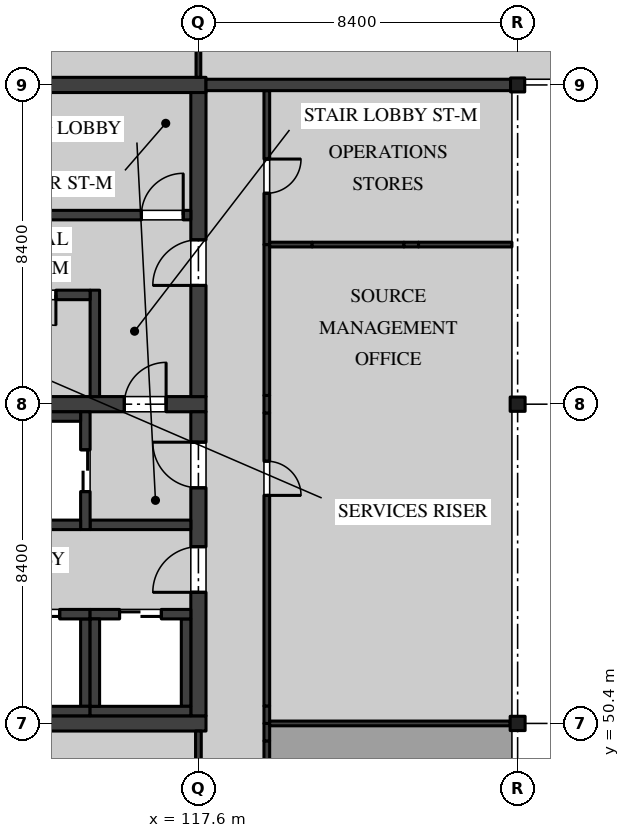
"""IFC4 building model, lengths in metres.
Left out: names, types, materials, properties, quantities, classifications, styles, units other than length and angle.
Written with IfcOpenShell. Run it as: python <this file> out.ifc"""

import sys

from ifc_helpers import new_model, si_unit, direction, frame, frame_2d, origin, origin_2d, place, context, subcontext, project, spatial, rectangle, i_section, extrude, element, fill, save


model = new_model("IFC4")
c1 = context("Model", 3, precision=1e-05, world=origin(), true_north=direction((0.0, 1.0)))
c2 = subcontext(c1, "Body", "Model", "MODEL_VIEW")
j1 = project(units=[si_unit("LENGTHUNIT", "METRE"), si_unit("PLANEANGLEUNIT", "RADIAN")], contexts=[c1])
p1 = place(None, origin())
s1 = spatial("IfcSite", under=j1, at=p1, CompositionType="ELEMENT")
p2 = place(p1, origin())
s2 = spatial("IfcBuilding", under=s1, at=p2, CompositionType="ELEMENT")
p3 = place(p2, frame((0.0, 0.0, 18.9)))
s3 = spatial("IfcBuildingStorey", under=s2, at=p3, CompositionType="ELEMENT", Elevation=18.9)
for number, where, z_axis, x_axis in (
    (1, (126.0, 50.4, 0.0), (0.0, 0.0, 1.0), (1.0, 0.0, 0.0)),
    (2, (126.0, 58.8, 0.0), (0.0, 0.0, 1.0), (1.0, 0.0, 0.0)),
):
    element("IfcColumn", number, at=place(p3, frame(where, z_axis=z_axis, x_axis=x_axis)), inside=s3, PredefinedType="COLUMN", context=c2, shape_type="SweptSolid", body=[
        extrude(i_section(OverallWidth=0.394, OverallDepth=0.376, WebThickness=0.017, FlangeThickness=0.028, FilletRadius=0.015, at=origin_2d()), origin(), (0.0, 0.0, 1.0), 4.37),
    ])
p4 = place(p3, frame((126.0, 67.2, 0.0), z_axis=(0.0, 0.0, 1.0), x_axis=(1.0, 0.0, 0.0)))
e3 = element("IfcColumn", 3, at=p4, inside=s3, PredefinedType="COLUMN", context=c2, shape_type="SweptSolid", body=[
    extrude(i_section(OverallWidth=0.373, OverallDepth=0.368, WebThickness=0.015, FlangeThickness=0.024, FilletRadius=0.015, at=origin_2d()), origin(), (0.0, 0.0, 1.0), 4.37),
])
p5 = place(p3, frame((109.0, 50.4, 0.0), z_axis=(0.0, 0.0, 1.0), x_axis=(1.0, 0.0, 0.0)))
e4 = element("IfcWall", 4, at=p5, inside=s3, PredefinedType="SHEAR", context=c2, shape_type="SweptSolid", body=[
    extrude(rectangle(XDim=8.8, YDim=0.4, at=frame_2d((4.4, 0.0))), origin(), (0.0, 0.0, 1.0), 4.37),
])
p6 = place(p3, frame((109.0, 58.8, 0.0), z_axis=(0.0, 0.0, 1.0), x_axis=(1.0, 0.0, 0.0)))
e5 = element("IfcWall", 5, at=p6, inside=s3, PredefinedType="SHEAR", context=c2, shape_type="SweptSolid", body=[
    extrude(rectangle(XDim=8.8, YDim=0.4, at=frame_2d((4.4, 0.0))), origin(), (0.0, 0.0, 1.0), 4.37),
])
p7 = place(p6, frame((6.65, 0.0, 0.0)))
e6 = element("IfcOpeningElement", 6, at=p7, cuts=e5, PredefinedType="OPENING", context=c2, shape_type="SweptSolid", body=[
    extrude(rectangle(XDim=1.1, YDim=2.1, at=frame_2d((0.55, 1.05))), frame((0.0, 0.21, 0.0), z_axis=(0.0, -1.0, 0.0), x_axis=(1.0, 0.0, 0.0)), (0.0, 0.0, 1.0), 0.42),
])
p8 = place(p3, frame((117.6, 50.6, 0.0), z_axis=(0.0, 0.0, 1.0), x_axis=(0.0, 1.0, 0.0)))
e7 = element("IfcWall", 7, at=p8, inside=s3, PredefinedType="SHEAR", context=c2, shape_type="SweptSolid", body=[
    extrude(rectangle(XDim=8.0, YDim=0.4, at=frame_2d((4.0, 0.0))), origin(), (0.0, 0.0, 1.0), 4.37),
])
p9 = place(p8, frame((3.25, 0.0, 0.0)))
e8 = element("IfcOpeningElement", 8, at=p9, cuts=e7, PredefinedType="OPENING", context=c2, shape_type="SweptSolid", body=[
    extrude(rectangle(XDim=1.2, YDim=2.1, at=frame_2d((0.6, 1.05))), frame((0.0, 0.21, 0.0), z_axis=(0.0, -1.0, 0.0), x_axis=(1.0, 0.0, 0.0)), (0.0, 0.0, 1.0), 0.42),
])
p10 = place(p8, frame((6.0, 0.0, 0.0)))
e9 = element("IfcOpeningElement", 9, at=p10, cuts=e7, PredefinedType="OPENING", context=c2, shape_type="SweptSolid", body=[
    extrude(rectangle(XDim=1.2, YDim=2.1, at=frame_2d((0.6, 1.05))), frame((0.0, 0.21, 0.0), z_axis=(0.0, -1.0, 0.0), x_axis=(1.0, 0.0, 0.0)), (0.0, 0.0, 1.0), 0.42),
])
p11 = place(p3, frame((114.75, 55.625, 0.0), z_axis=(0.0, 0.0, 1.0), x_axis=(1.0, 0.0, 0.0)))
e10 = element("IfcWall", 10, at=p11, inside=s3, PredefinedType="SOLIDWALL", context=c2, shape_type="SweptSolid", body=[
    extrude(rectangle(XDim=2.65, YDim=0.25, at=frame_2d((1.325, 0.0))), origin(), (0.0, 0.0, 1.0), 4.37),
])
p12 = place(p3, frame((109.0, 67.2, 0.0), z_axis=(0.0, 0.0, 1.0), x_axis=(1.0, 0.0, 0.0)))
e11 = element("IfcWall", 11, at=p12, inside=s3, PredefinedType="SHEAR", context=c2, shape_type="SweptSolid", body=[
    extrude(rectangle(XDim=8.8, YDim=0.4, at=frame_2d((4.4, 0.0))), origin(), (0.0, 0.0, 1.0), 4.37),
])
p13 = place(p3, frame((117.6, 59.0, 0.0), z_axis=(0.0, 0.0, 1.0), x_axis=(0.0, 1.0, 0.0)))
e12 = element("IfcWall", 12, at=p13, inside=s3, PredefinedType="SHEAR", context=c2, shape_type="SweptSolid", body=[
    extrude(rectangle(XDim=8.0, YDim=0.4, at=frame_2d((4.0, 0.0))), origin(), (0.0, 0.0, 1.0), 4.37),
])
p14 = place(p13, frame((2.925, 0.0, 0.0)))
e13 = element("IfcOpeningElement", 13, at=p14, cuts=e12, PredefinedType="OPENING", context=c2, shape_type="SweptSolid", body=[
    extrude(rectangle(XDim=1.2, YDim=2.1, at=frame_2d((0.6, 1.05))), frame((0.0, 0.21, 0.0), z_axis=(0.0, -1.0, 0.0), x_axis=(1.0, 0.0, 0.0)), (0.0, 0.0, 1.0), 0.42),
])
p15 = place(p3, frame((117.4, 63.775, 0.0), z_axis=(0.0, 0.0, 1.0), x_axis=(-1.0, 0.0, 0.0)))
e14 = element("IfcWall", 14, at=p15, inside=s3, PredefinedType="SOLIDWALL", context=c2, shape_type="SweptSolid", body=[
    extrude(rectangle(XDim=8.0, YDim=0.25, at=frame_2d((4.0, 0.0))), origin(), (0.0, 0.0, 1.0), 4.37),
])
p16 = place(p15, frame((0.2, 0.0, 0.0)))
e15 = element("IfcOpeningElement", 15, at=p16, cuts=e14, PredefinedType="OPENING", context=c2, shape_type="SweptSolid", body=[
    extrude(rectangle(XDim=1.1, YDim=2.1, at=frame_2d((0.55, 1.05))), frame((0.0, 0.135, 0.0), z_axis=(0.0, -1.0, 0.0), x_axis=(1.0, 0.0, 0.0)), (0.0, 0.0, 1.0), 0.27),
])
p17 = place(p3, frame((114.875, 61.8, 0.0), z_axis=(0.0, 0.0, 1.0), x_axis=(0.0, -1.0, 0.0)))
e16 = element("IfcWall", 16, at=p17, inside=s3, PredefinedType="SOLIDWALL", context=c2, shape_type="SweptSolid", body=[
    extrude(rectangle(XDim=2.8, YDim=0.25, at=frame_2d((1.4, 0.0))), origin(), (0.0, 0.0, 1.0), 4.37),
])
p18 = place(p3, frame((114.75, 61.675, 0.0), z_axis=(0.0, 0.0, 1.0), x_axis=(-1.0, 0.0, 0.0)))
e17 = element("IfcWall", 17, at=p18, inside=s3, PredefinedType="SOLIDWALL", context=c2, shape_type="SweptSolid", body=[
    extrude(rectangle(XDim=5.35, YDim=0.25, at=frame_2d((2.675, 0.0))), origin(), (0.0, 0.0, 1.0), 4.37),
])
p19 = place(p18, frame((3.65, 0.0, 0.0)))
e18 = element("IfcOpeningElement", 18, at=p19, cuts=e17, PredefinedType="OPENING", context=c2, shape_type="SweptSolid", body=[
    extrude(rectangle(XDim=0.9, YDim=2.1, at=frame_2d((0.45, 1.05))), frame((0.0, 0.135, 0.0), z_axis=(0.0, -1.0, 0.0), x_axis=(1.0, 0.0, 0.0)), (0.0, 0.0, 1.0), 0.27),
])
p20 = place(p18, frame((0.9, 0.0, 0.0)))
e19 = element("IfcOpeningElement", 19, at=p20, cuts=e17, PredefinedType="OPENING", context=c2, shape_type="SweptSolid", body=[
    extrude(rectangle(XDim=0.8, YDim=2.1, at=frame_2d((0.4, 1.05))), frame((0.0, 0.135, 0.0), z_axis=(0.0, -1.0, 0.0), x_axis=(1.0, 0.0, 0.0)), (0.0, 0.0, 1.0), 0.27),
])
p21 = place(p3, frame((114.625, 55.5, 0.0), z_axis=(0.0, 0.0, 1.0), x_axis=(0.0, 1.0, 0.0)))
e20 = element("IfcWall", 20, at=p21, inside=s3, PredefinedType="SOLIDWALL", context=c2, shape_type="SweptSolid", body=[
    extrude(rectangle(XDim=3.1, YDim=0.25, at=frame_2d((1.55, 0.0))), origin(), (0.0, 0.0, 1.0), 4.37),
])
p22 = place(p21, frame((1.0, 0.0, 0.0)))
e21 = element("IfcOpeningElement", 21, at=p22, cuts=e20, PredefinedType="OPENING", context=c2, shape_type="SweptSolid", body=[
    extrude(rectangle(XDim=1.1, YDim=2.1, at=frame_2d((0.55, 1.05))), frame((0.0, 0.135, 0.0), z_axis=(0.0, -1.0, 0.0), x_axis=(1.0, 0.0, 0.0)), (0.0, 0.0, 1.0), 0.27),
])
for number, where, z_axis, x_axis in (
    (22, (111.9, 58.475, 0.0), (0.0, 0.0, 1.0), (1.0, 0.0, 0.0)),
    (23, (111.9, 55.625, 0.0), (0.0, 0.0, 1.0), (1.0, 0.0, 0.0)),
):
    element("IfcWall", number, at=place(p3, frame(where, z_axis=z_axis, x_axis=x_axis)), inside=s3, PredefinedType="SOLIDWALL", context=c2, shape_type="SweptSolid", body=[
        extrude(rectangle(XDim=2.6, YDim=0.25, at=frame_2d((1.3, 0.0))), origin(), (0.0, 0.0, 1.0), 4.37),
    ])
p23 = place(p3, frame((114.625, 50.85, 0.0), z_axis=(0.0, 0.0, 1.0), x_axis=(0.0, 1.0, 0.0)))
e24 = element("IfcWall", 24, at=p23, inside=s3, PredefinedType="SOLIDWALL", context=c2, shape_type="SweptSolid", body=[
    extrude(rectangle(XDim=2.3, YDim=0.25, at=frame_2d((1.15, 0.0))), origin(), (0.0, 0.0, 1.0), 4.37),
])
p24 = place(p3, frame((112.05, 53.275, 0.0), z_axis=(0.0, 0.0, 1.0), x_axis=(1.0, 0.0, 0.0)))
e25 = element("IfcWall", 25, at=p24, inside=s3, PredefinedType="SOLIDWALL", context=c2, shape_type="SweptSolid", body=[
    extrude(rectangle(XDim=2.7, YDim=0.25, at=frame_2d((1.35, 0.0))), origin(), (0.0, 0.0, 1.0), 4.37),
])
p25 = place(p24, frame((0.8, 0.0, 0.0)))
e26 = element("IfcOpeningElement", 26, at=p25, cuts=e25, PredefinedType="OPENING", context=c2, shape_type="SweptSolid", body=[
    extrude(rectangle(XDim=1.1, YDim=2.1, at=frame_2d((0.55, 1.05))), frame((0.0, 0.135, 0.0), z_axis=(0.0, -1.0, 0.0), x_axis=(1.0, 0.0, 0.0)), (0.0, 0.0, 1.0), 0.27),
])
p26 = place(p3, frame((112.05, 50.725, 0.0), z_axis=(0.0, 0.0, 1.0), x_axis=(1.0, 0.0, 0.0)))
e27 = element("IfcWall", 27, at=p26, inside=s3, PredefinedType="SOLIDWALL", context=c2, shape_type="SweptSolid", body=[
    extrude(rectangle(XDim=2.7, YDim=0.25, at=frame_2d((1.35, 0.0))), origin(), (0.0, 0.0, 1.0), 4.37),
])
p27 = place(p3, frame((117.275, 50.85, 0.0), z_axis=(0.0, 0.0, 1.0), x_axis=(0.0, 1.0, 0.0)))
e28 = element("IfcWall", 28, at=p27, inside=s3, PredefinedType="SOLIDWALL", context=c2, shape_type="SweptSolid", body=[
    extrude(rectangle(XDim=2.3, YDim=0.25, at=frame_2d((1.15, 0.0))), origin(), (0.0, 0.0, 1.0), 4.37),
])
p28 = place(p3, frame((114.75, 53.275, 0.0), z_axis=(0.0, 0.0, 1.0), x_axis=(1.0, 0.0, 0.0)))
e29 = element("IfcWall", 29, at=p28, inside=s3, PredefinedType="SOLIDWALL", context=c2, shape_type="SweptSolid", body=[
    extrude(rectangle(XDim=2.65, YDim=0.25, at=frame_2d((1.325, 0.0))), origin(), (0.0, 0.0, 1.0), 4.37),
])
p29 = place(p28, frame((0.775, 0.0, 0.0)))
e30 = element("IfcOpeningElement", 30, at=p29, cuts=e29, PredefinedType="OPENING", context=c2, shape_type="SweptSolid", body=[
    extrude(rectangle(XDim=1.1, YDim=2.1, at=frame_2d((0.55, 1.05))), frame((0.0, 0.135, 0.0), z_axis=(0.0, -1.0, 0.0), x_axis=(1.0, 0.0, 0.0)), (0.0, 0.0, 1.0), 0.27),
])
p30 = place(p3, frame((114.75, 50.725, 0.0), z_axis=(0.0, 0.0, 1.0), x_axis=(1.0, 0.0, 0.0)))
e31 = element("IfcWall", 31, at=p30, inside=s3, PredefinedType="SOLIDWALL", context=c2, shape_type="SweptSolid", body=[
    extrude(rectangle(XDim=2.65, YDim=0.25, at=frame_2d((1.325, 0.0))), origin(), (0.0, 0.0, 1.0), 4.37),
])
p31 = place(p3, frame((114.875, 50.85, 0.0), z_axis=(0.0, 0.0, 1.0), x_axis=(0.0, 1.0, 0.0)))
e32 = element("IfcWall", 32, at=p31, inside=s3, PredefinedType="SOLIDWALL", context=c2, shape_type="SweptSolid", body=[
    extrude(rectangle(XDim=2.3, YDim=0.25, at=frame_2d((1.15, 0.0))), origin(), (0.0, 0.0, 1.0), 4.37),
])
p32 = place(p3, frame((119.4, 42.23, 0.0), z_axis=(0.0, 0.0, 1.0), x_axis=(0.0, 1.0, 0.0)))
e33 = element("IfcWall", 33, at=p32, inside=s3, PredefinedType="PARTITIONING", context=c2, shape_type="SweptSolid", body=[
    extrude(rectangle(XDim=7.71, YDim=0.15, at=frame_2d((3.855, 0.0))), origin(), (0.0, 0.0, 1.0), 4.37),
])
p33 = place(p3, frame((119.4, 49.94, 0.0), z_axis=(0.0, 0.0, 1.0), x_axis=(0.0, 1.0, 0.0)))
e34 = element("IfcWall", 34, at=p33, inside=s3, PredefinedType="PARTITIONING", context=c2, shape_type="SweptSolid", body=[
    extrude(rectangle(XDim=0.46, YDim=0.15, at=frame_2d((0.23, 0.0))), origin(), (0.0, 0.0, 1.0), 3.746),
])
p34 = place(p3, frame((119.4, 50.4, 0.0), z_axis=(0.0, 0.0, 1.0), x_axis=(0.0, 1.0, 0.0)))
e35 = element("IfcWall", 35, at=p34, inside=s3, PredefinedType="PARTITIONING", context=c2, shape_type="SweptSolid", body=[
    extrude(rectangle(XDim=0.46, YDim=0.15, at=frame_2d((0.23, 0.0))), origin(), (0.0, 0.0, 1.0), 3.746),
])
p35 = place(p3, frame((119.4, 50.86, 0.0), z_axis=(0.0, 0.0, 1.0), x_axis=(0.0, 1.0, 0.0)))
e36 = element("IfcWall", 36, at=p35, inside=s3, PredefinedType="PARTITIONING", context=c2, shape_type="SweptSolid", body=[
    extrude(rectangle(XDim=7.71, YDim=0.15, at=frame_2d((3.855, 0.0))), origin(), (0.0, 0.0, 1.0), 4.37),
])
p36 = place(p35, frame((5.54, 0.0, 0.0)))
e37 = element("IfcOpeningElement", 37, at=p36, cuts=e36, PredefinedType="OPENING", context=c2, shape_type="SweptSolid", body=[
    extrude(rectangle(XDim=0.9, YDim=2.1, at=frame_2d((0.45, 1.05))), frame((0.0, 0.085, 0.0), z_axis=(0.0, -1.0, 0.0), x_axis=(1.0, 0.0, 0.0)), (0.0, 0.0, 1.0), 0.17),
])
p37 = place(p3, frame((119.4, 58.57, 0.0), z_axis=(0.0, 0.0, 1.0), x_axis=(0.0, 1.0, 0.0)))
e38 = element("IfcWall", 38, at=p37, inside=s3, PredefinedType="PARTITIONING", context=c2, shape_type="SweptSolid", body=[
    extrude(rectangle(XDim=0.46, YDim=0.15, at=frame_2d((0.23, 0.0))), origin(), (0.0, 0.0, 1.0), 3.746),
])
p38 = place(p3, frame((119.4, 59.03, 0.0), z_axis=(0.0, 0.0, 1.0), x_axis=(0.0, 1.0, 0.0)))
e39 = element("IfcWall", 39, at=p38, inside=s3, PredefinedType="PARTITIONING", context=c2, shape_type="SweptSolid", body=[
    extrude(rectangle(XDim=3.97, YDim=0.15, at=frame_2d((1.985, 0.0))), origin(), (0.0, 0.0, 1.0), 4.37),
])
p39 = place(p3, frame((119.4, 63.0, 0.0), z_axis=(0.0, 0.0, 1.0), x_axis=(0.0, 1.0, 0.0)))
e40 = element("IfcWall", 40, at=p39, inside=s3, PredefinedType="PARTITIONING", context=c2, shape_type="SweptSolid", body=[
    extrude(rectangle(XDim=4.05, YDim=0.15, at=frame_2d((2.025, 0.0))), origin(), (0.0, 0.0, 1.0), 4.37),
])
p40 = place(p39, frame((1.35, 0.0, 0.0)))
e41 = element("IfcOpeningElement", 41, at=p40, cuts=e40, PredefinedType="OPENING", context=c2, shape_type="SweptSolid", body=[
    extrude(rectangle(XDim=0.9, YDim=2.1, at=frame_2d((0.45, 1.05))), frame((0.0, 0.085, 0.0), z_axis=(0.0, -1.0, 0.0), x_axis=(1.0, 0.0, 0.0)), (0.0, 0.0, 1.0), 0.17),
])
p41 = place(p3, frame((117.6, 42.2, 0.0), z_axis=(0.0, 0.0, 1.0), x_axis=(0.0, 1.0, 0.0)))
e42 = element("IfcWall", 42, at=p41, inside=s3, PredefinedType="PARTITIONING", context=c2, shape_type="SweptSolid", body=[
    extrude(rectangle(XDim=8.0, YDim=0.15, at=frame_2d((4.0, 0.0))), origin(), (0.0, 0.0, 1.0), 3.746),
])
p42 = place(p41, frame((3.55, 0.0, 0.0)))
e43 = element("IfcOpeningElement", 43, at=p42, cuts=e42, PredefinedType="OPENING", context=c2, shape_type="SweptSolid", body=[
    extrude(rectangle(XDim=0.9, YDim=2.1, at=frame_2d((0.45, 1.05))), frame((0.0, 0.085, 0.0), z_axis=(0.0, -1.0, 0.0), x_axis=(1.0, 0.0, 0.0)), (0.0, 0.0, 1.0), 0.17),
])
p43 = place(p3, frame((119.475, 50.4, 0.0), z_axis=(0.0, 0.0, 1.0), x_axis=(1.0, 0.0, 0.0)))
e44 = element("IfcWall", 44, at=p43, inside=s3, PredefinedType="PARTITIONING", context=c2, shape_type="SweptSolid", body=[
    extrude(rectangle(XDim=6.328, YDim=0.125, at=frame_2d((3.164, 0.0))), origin(), (0.0, 0.0, 1.0), 3.746),
])
p44 = place(p3, frame((119.475, 63.0, 0.0), z_axis=(0.0, 0.0, 1.0), x_axis=(1.0, 0.0, 0.0)))
e45 = element("IfcWall", 45, at=p44, inside=s3, PredefinedType="PARTITIONING", context=c2, shape_type="SweptSolid", body=[
    extrude(rectangle(XDim=1.118, YDim=0.125, at=frame_2d((0.559, 0.0))), origin(), (0.0, 0.0, 1.0), 3.895),
])
p45 = place(p3, frame((120.593, 63.0, 0.0), z_axis=(0.0, 0.0, 1.0), x_axis=(1.0, 0.0, 0.0)))
e46 = element("IfcWall", 46, at=p45, inside=s3, PredefinedType="PARTITIONING", context=c2, shape_type="SweptSolid", body=[
    extrude(rectangle(XDim=2.415, YDim=0.125, at=frame_2d((1.208, 0.0))), origin(), (0.0, 0.0, 1.0), 4.37),
])
p46 = place(p3, frame((123.008, 63.0, 0.0), z_axis=(0.0, 0.0, 1.0), x_axis=(1.0, 0.0, 0.0)))
e47 = element("IfcWall", 47, at=p46, inside=s3, PredefinedType="PARTITIONING", context=c2, shape_type="SweptSolid", body=[
    extrude(rectangle(XDim=0.384, YDim=0.125, at=frame_2d((0.192, 0.0))), origin(), (0.0, 0.0, 1.0), 3.895),
])
p47 = place(p3, frame((123.392, 63.0, 0.0), z_axis=(0.0, 0.0, 1.0), x_axis=(1.0, 0.0, 0.0)))
e48 = element("IfcWall", 48, at=p47, inside=s3, PredefinedType="PARTITIONING", context=c2, shape_type="SweptSolid", body=[
    extrude(rectangle(XDim=2.458, YDim=0.125, at=frame_2d((1.229, 0.0))), origin(), (0.0, 0.0, 1.0), 4.37),
])
p48 = place(p3, frame((117.6, 67.4, 0.0), z_axis=(0.0, 0.0, 1.0), x_axis=(0.0, 1.0, 0.0)))
e49 = element("IfcWall", 49, at=p48, inside=s3, PredefinedType="PARTITIONING", context=c2, shape_type="SweptSolid", body=[
    extrude(rectangle(XDim=6.625, YDim=0.125, at=frame_2d((3.312, 0.0))), origin(), (0.0, 0.0, 1.0), 3.819),
])
p49 = place(p3, frame((125.997, 67.2, 0.0), z_axis=(0.0, 0.0, 1.0), x_axis=(-1.0, 0.0, 0.0)))
e50 = element("IfcWall", 50, at=p49, inside=s3, PredefinedType="SOLIDWALL", context=c2, shape_type="SweptSolid", body=[
    extrude(rectangle(XDim=8.197, YDim=0.3, at=frame_2d((4.099, 0.0))), origin(), (0.0, 0.0, 1.0), 3.746),
])
p50 = place(p9, origin())
e51 = element("IfcDoor", 51, at=p50, inside=s3, OperationType="SINGLE_SWING_RIGHT", PredefinedType="DOOR", context=c2, shape_type="SweptSolid", body=[
    extrude(rectangle(XDim=1.2, YDim=2.1, at=frame_2d((0.6, 1.05))), frame((0.0, 0.035, 0.0), z_axis=(0.0, -1.0, 0.0), x_axis=(1.0, 0.0, 0.0)), (0.0, 0.0, 1.0), 0.07),
])
fill(e8, e51)
p51 = place(p10, origin())
e52 = element("IfcDoor", 52, at=p51, inside=s3, OperationType="SINGLE_SWING_LEFT", PredefinedType="DOOR", context=c2, shape_type="SweptSolid", body=[
    extrude(rectangle(XDim=1.2, YDim=2.1, at=frame_2d((0.6, 1.05))), frame((0.0, 0.035, 0.0), z_axis=(0.0, -1.0, 0.0), x_axis=(1.0, 0.0, 0.0)), (0.0, 0.0, 1.0), 0.07),
])
fill(e9, e52)
p52 = place(p7, origin())
e53 = element("IfcDoor", 53, at=p52, inside=s3, OperationType="SINGLE_SWING_LEFT", PredefinedType="DOOR", context=c2, shape_type="SweptSolid", body=[
    extrude(rectangle(XDim=1.1, YDim=2.1, at=frame_2d((0.55, 1.05))), frame((0.0, 0.035, 0.0), z_axis=(0.0, -1.0, 0.0), x_axis=(1.0, 0.0, 0.0)), (0.0, 0.0, 1.0), 0.07),
])
fill(e6, e53)
p53 = place(p14, origin())
e54 = element("IfcDoor", 54, at=p53, inside=s3, OperationType="SINGLE_SWING_RIGHT", PredefinedType="DOOR", context=c2, shape_type="SweptSolid", body=[
    extrude(rectangle(XDim=1.2, YDim=2.1, at=frame_2d((0.6, 1.05))), frame((0.0, 0.035, 0.0), z_axis=(0.0, -1.0, 0.0), x_axis=(1.0, 0.0, 0.0)), (0.0, 0.0, 1.0), 0.07),
])
fill(e13, e54)
p54 = place(p20, origin())
e55 = element("IfcDoor", 55, at=p54, inside=s3, OperationType="SINGLE_SWING_RIGHT", PredefinedType="DOOR", context=c2, shape_type="SweptSolid", body=[
    extrude(rectangle(XDim=0.8, YDim=2.1, at=frame_2d((0.4, 1.05))), frame((0.0, 0.035, 0.0), z_axis=(0.0, -1.0, 0.0), x_axis=(1.0, 0.0, 0.0)), (0.0, 0.0, 1.0), 0.07),
])
fill(e19, e55)
p55 = place(p16, frame((1.1, 0.0, 0.0), z_axis=(0.0, 0.0, 1.0), x_axis=(-1.0, 0.0, 0.0)))
e56 = element("IfcDoor", 56, at=p55, inside=s3, OperationType="SINGLE_SWING_LEFT", PredefinedType="DOOR", context=c2, shape_type="SweptSolid", body=[
    extrude(rectangle(XDim=1.1, YDim=2.1, at=frame_2d((0.55, 1.05))), frame((0.0, 0.035, 0.0), z_axis=(0.0, -1.0, 0.0), x_axis=(1.0, 0.0, 0.0)), (0.0, 0.0, 1.0), 0.07),
])
fill(e15, e56)
p56 = place(p22, origin())
e57 = element("IfcDoor", 57, at=p56, inside=s3, OperationType="DOUBLE_DOOR_SLIDING", PredefinedType="DOOR", context=c2, shape_type="SweptSolid", body=[
    extrude(rectangle(XDim=1.1, YDim=2.1, at=frame_2d((0.55, 1.05))), frame((0.0, 0.04, 0.0), z_axis=(0.0, -1.0, 0.0), x_axis=(1.0, 0.0, 0.0)), (0.0, 0.0, 1.0), 0.08),
])
fill(e21, e57)
p57 = place(p25, origin())
e58 = element("IfcDoor", 58, at=p57, inside=s3, OperationType="DOUBLE_DOOR_SLIDING", PredefinedType="DOOR", context=c2, shape_type="SweptSolid", body=[
    extrude(rectangle(XDim=1.1, YDim=2.1, at=frame_2d((0.55, 1.05))), frame((0.0, 0.04, 0.0), z_axis=(0.0, -1.0, 0.0), x_axis=(1.0, 0.0, 0.0)), (0.0, 0.0, 1.0), 0.08),
])
fill(e26, e58)
p58 = place(p29, origin())
e59 = element("IfcDoor", 59, at=p58, inside=s3, OperationType="DOUBLE_DOOR_SLIDING", PredefinedType="DOOR", context=c2, shape_type="SweptSolid", body=[
    extrude(rectangle(XDim=1.1, YDim=2.1, at=frame_2d((0.55, 1.05))), frame((0.0, 0.04, 0.0), z_axis=(0.0, -1.0, 0.0), x_axis=(1.0, 0.0, 0.0)), (0.0, 0.0, 1.0), 0.08),
])
fill(e30, e59)
p59 = place(p36, frame((0.9, 0.0, 0.0), z_axis=(0.0, 0.0, 1.0), x_axis=(-1.0, 0.0, 0.0)))
e60 = element("IfcDoor", 60, at=p59, inside=s3, OperationType="SINGLE_SWING_LEFT", PredefinedType="DOOR", context=c2, shape_type="SweptSolid", body=[
    extrude(rectangle(XDim=0.9, YDim=2.1, at=frame_2d((0.45, 1.05))), frame((0.0, 0.025, 0.0), z_axis=(0.0, -1.0, 0.0), x_axis=(1.0, 0.0, 0.0)), (0.0, 0.0, 1.0), 0.05),
])
fill(e37, e60)
p60 = place(p40, frame((0.9, 0.0, 0.0), z_axis=(0.0, 0.0, 1.0), x_axis=(-1.0, 0.0, 0.0)))
e61 = element("IfcDoor", 61, at=p60, inside=s3, OperationType="SINGLE_SWING_RIGHT", PredefinedType="DOOR", context=c2, shape_type="SweptSolid", body=[
    extrude(rectangle(XDim=0.9, YDim=2.1, at=frame_2d((0.45, 1.05))), frame((0.0, 0.025, 0.0), z_axis=(0.0, -1.0, 0.0), x_axis=(1.0, 0.0, 0.0)), (0.0, 0.0, 1.0), 0.05),
])
fill(e41, e61)
save(model, sys.argv[1])
